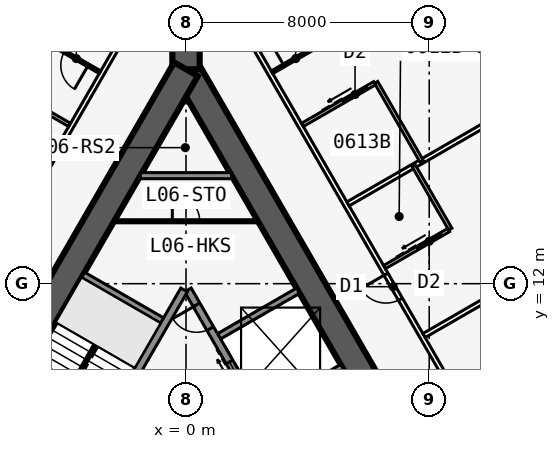
"""IFC4 building model, lengths in metres.
Left out: names, types, materials, properties, quantities, classifications, styles, units other than length and angle.
Written with IfcOpenShell. Run it as: python <this file> out.ifc"""

import sys

from ifc_helpers import new_model, si_unit, direction, frame, frame_2d, origin, place, context, subcontext, project, spatial, rectangle, extrude, element, fill, save


model = new_model("IFC4")
c1 = context("Model", 3, precision=1e-05, world=origin(), true_north=direction((0.0, 1.0)))
c2 = subcontext(c1, "Body", "Model", "MODEL_VIEW")
j1 = project(units=[si_unit("LENGTHUNIT", "METRE"), si_unit("PLANEANGLEUNIT", "RADIAN")], contexts=[c1])
p1 = place(None, origin())
s1 = spatial("IfcSite", under=j1, at=p1, CompositionType="ELEMENT")
p2 = place(p1, origin())
s2 = spatial("IfcBuilding", under=s1, at=p2, CompositionType="ELEMENT")
p3 = place(p2, frame((0.0, 0.0, 31.9)))
s3 = spatial("IfcBuildingStorey", under=s2, at=p3, CompositionType="ELEMENT", Elevation=31.9)
p4 = place(p3, frame((16.5, -9.526, 0.0), z_axis=(0.0, 0.0, 1.0), x_axis=(-0.499999749417, 0.866025548458, 0.0)))
e1 = element("IfcWall", 1, at=p4, inside=s3, PredefinedType="SHEAR", context=c2, shape_type="SweptSolid", body=[
    extrude(rectangle(XDim=33.0, YDim=0.9, at=frame_2d((16.5, 0.0))), origin(), (0.0, 0.0, 1.0), 3.4),
])
p5 = place(p4, frame((14.15, 0.0, 0.0)))
e2 = element("IfcOpeningElement", 2, at=p5, cuts=e1, PredefinedType="OPENING", context=c2, shape_type="SweptSolid", body=[
    extrude(rectangle(XDim=1.8, YDim=2.13, at=frame_2d((0.9, 1.065))), frame((0.0, 0.46, 0.0), z_axis=(0.0, -1.0, 0.0), x_axis=(1.0, 0.0, 0.0)), (0.0, 0.0, 1.0), 0.92),
])
p6 = place(p4, frame((12.6, 0.0, 0.0)))
e3 = element("IfcOpeningElement", 3, at=p6, cuts=e1, PredefinedType="OPENING", context=c2, shape_type="SweptSolid", body=[
    extrude(rectangle(XDim=1.0, YDim=2.13, at=frame_2d((0.5, 1.065))), frame((0.0, 0.46, 0.0), z_axis=(0.0, -1.0, 0.0), x_axis=(1.0, 0.0, 0.0)), (0.0, 0.0, 1.0), 0.92),
])
p7 = place(p3, frame((5.379, 2.586, 0.0), z_axis=(0.0, 0.0, 1.0), x_axis=(-0.500001375892, 0.866024609411, 0.0)))
e4 = element("IfcWall", 4, at=p7, inside=s3, PredefinedType="SOLIDWALL", context=c2, shape_type="SweptSolid", body=[
    extrude(rectangle(XDim=10.633, YDim=0.25, at=frame_2d((5.316, 0.0))), origin(), (0.0, 0.0, 1.0), 3.235),
])
p8 = place(p7, frame((9.164, 0.0, 0.0)))
e5 = element("IfcOpeningElement", 5, at=p8, cuts=e4, PredefinedType="OPENING", context=c2, shape_type="SweptSolid", body=[
    extrude(rectangle(XDim=0.9, YDim=2.13, at=frame_2d((0.45, 1.065))), frame((0.0, 0.135, 0.0), z_axis=(0.0, -1.0, 0.0), x_axis=(1.0, 0.0, 0.0)), (0.0, 0.0, 1.0), 0.27),
])
p9 = place(p7, frame((1.0, 0.0, 0.0)))
e6 = element("IfcOpeningElement", 6, at=p9, cuts=e4, PredefinedType="OPENING", context=c2, shape_type="SweptSolid", body=[
    extrude(rectangle(XDim=1.1, YDim=2.13, at=frame_2d((0.55, 1.065))), frame((0.0, 0.135, 0.0), z_axis=(0.0, -1.0, 0.0), x_axis=(1.0, 0.0, 0.0)), (0.0, 0.0, 1.0), 0.27),
])
p10 = place(p7, frame((3.9, 0.0, 0.0)))
e7 = element("IfcOpeningElement", 7, at=p10, cuts=e4, PredefinedType="OPENING", context=c2, shape_type="SweptSolid", body=[
    extrude(rectangle(XDim=1.1, YDim=2.13, at=frame_2d((0.55, 1.065))), frame((0.0, 0.135, 0.0), z_axis=(0.0, -1.0, 0.0), x_axis=(1.0, 0.0, 0.0)), (0.0, 0.0, 1.0), 0.27),
])
p11 = place(p7, frame((6.8, 0.0, 0.0)))
e8 = element("IfcOpeningElement", 8, at=p11, cuts=e4, PredefinedType="OPENING", context=c2, shape_type="SweptSolid", body=[
    extrude(rectangle(XDim=1.1, YDim=2.13, at=frame_2d((0.55, 1.065))), frame((0.0, 0.135, 0.0), z_axis=(0.0, -1.0, 0.0), x_axis=(1.0, 0.0, 0.0)), (0.0, 0.0, 1.0), 0.27),
])
for number, where, z_axis, x_axis in (
    (9, (2.429, 7.696, 0.0), (0.0, 0.0, 1.0), (0.866, 0.5, 0.0)),
    (10, (0.979, 10.207, 0.0), (0.0, 0.0, 1.0), (0.866, 0.5, 0.0)),
):
    element("IfcWall", number, at=place(p3, frame(where, z_axis=z_axis, x_axis=x_axis)), inside=s3, PredefinedType="SOLIDWALL", context=c2, shape_type="SweptSolid", body=[
        extrude(rectangle(XDim=3.125, YDim=0.2, at=frame_2d((1.562, 0.0))), origin(), (0.0, 0.0, 1.0), 3.235),
    ])
p12 = place(p3, frame((0.0, 19.052, 0.0), z_axis=(0.0, 0.0, 1.0), x_axis=(-0.499999749417, -0.866025548458, 0.0)))
e11 = element("IfcWall", 11, at=p12, inside=s3, PredefinedType="SHEAR", context=c2, shape_type="SweptSolid", body=[
    extrude(rectangle(XDim=33.0, YDim=0.9, at=frame_2d((16.5, 0.0))), origin(), (0.0, 0.0, 1.0), 3.4),
])
p13 = place(p12, frame((14.15, 0.0, 0.0)))
e12 = element("IfcOpeningElement", 12, at=p13, cuts=e11, PredefinedType="OPENING", context=c2, shape_type="SweptSolid", body=[
    extrude(rectangle(XDim=1.8, YDim=2.13, at=frame_2d((0.9, 1.065))), frame((0.0, 0.46, 0.0), z_axis=(0.0, -1.0, 0.0), x_axis=(1.0, 0.0, 0.0)), (0.0, 0.0, 1.0), 0.92),
])
p14 = place(p12, frame((12.6, 0.0, 0.0)))
e13 = element("IfcOpeningElement", 13, at=p14, cuts=e11, PredefinedType="OPENING", context=c2, shape_type="SweptSolid", body=[
    extrude(rectangle(XDim=1.0, YDim=2.13, at=frame_2d((0.5, 1.065))), frame((0.0, 0.46, 0.0), z_axis=(0.0, -1.0, 0.0), x_axis=(1.0, 0.0, 0.0)), (0.0, 0.0, 1.0), 0.92),
])
p15 = place(p3, frame((-0.062, 11.794, 0.0), z_axis=(0.0, 0.0, 1.0), x_axis=(-0.500006680225, -0.86602154692, 0.0)))
e14 = element("IfcWall", 14, at=p15, inside=s3, PredefinedType="SOLIDWALL", context=c2, shape_type="SweptSolid", body=[
    extrude(rectangle(XDim=7.733, YDim=0.25, at=frame_2d((3.866, 0.0))), origin(), (0.0, 0.0, 1.0), 3.235),
])
p16 = place(p3, frame((-0.679, 10.727, 0.0), z_axis=(0.0, 0.0, 1.0), x_axis=(-0.866022959057, 0.500004234368, 0.0)))
e15 = element("IfcWall", 15, at=p16, inside=s3, PredefinedType="SOLIDWALL", context=c2, shape_type="SweptSolid", body=[
    extrude(rectangle(XDim=3.125, YDim=0.2, at=frame_2d((1.562, 0.0))), origin(), (0.0, 0.0, 1.0), 3.235),
])
p17 = place(p3, frame((0.0, 19.052, 0.0), z_axis=(0.0, 0.0, 1.0), x_axis=(0.0, 1.0, 0.0)))
e16 = element("IfcWall", 16, at=p17, inside=s3, PredefinedType="SHEAR", context=c2, shape_type="SweptSolid", body=[
    extrude(rectangle(XDim=4.746, YDim=0.9, at=frame_2d((2.373, 0.0))), origin(), (0.0, 0.0, 1.0), 3.4),
])
p18 = place(p17, frame((1.8, 0.0, 0.0)))
e17 = element("IfcOpeningElement", 17, at=p18, cuts=e16, PredefinedType="OPENING", context=c2, shape_type="SweptSolid", body=[
    extrude(rectangle(XDim=1.8, YDim=2.13, at=frame_2d((0.9, 1.065))), frame((0.0, 0.46, 0.0), z_axis=(0.0, -1.0, 0.0), x_axis=(1.0, 0.0, 0.0)), (0.0, 0.0, 1.0), 0.92),
])
p19 = place(p3, frame((20.027, -10.985, 0.0), z_axis=(0.0, 0.0, 1.0), x_axis=(-0.500001677587, 0.866024435227, 0.0)))
e18 = element("IfcWall", 18, at=p19, inside=s3, PredefinedType="PARTITIONING", context=c2, shape_type="SweptSolid", body=[
    extrude(rectangle(XDim=39.054, YDim=0.15, at=frame_2d((19.527, 0.0))), origin(), (0.0, 0.0, 1.0), 3.235),
])
p20 = place(p19, frame((0.352, 0.0, 0.0)))
e19 = element("IfcOpeningElement", 19, at=p20, cuts=e18, PredefinedType="OPENING", context=c2, shape_type="SweptSolid", body=[
    extrude(rectangle(XDim=0.95, YDim=2.13, at=frame_2d((0.475, 1.065))), frame((0.0, 0.085, 0.0), z_axis=(0.0, -1.0, 0.0), x_axis=(1.0, 0.0, 0.0)), (0.0, 0.0, 1.0), 0.17),
])
p21 = place(p19, frame((5.952, 0.0, 0.0)))
e20 = element("IfcOpeningElement", 20, at=p21, cuts=e18, PredefinedType="OPENING", context=c2, shape_type="SweptSolid", body=[
    extrude(rectangle(XDim=0.95, YDim=2.13, at=frame_2d((0.475, 1.065))), frame((0.0, 0.085, 0.0), z_axis=(0.0, -1.0, 0.0), x_axis=(1.0, 0.0, 0.0)), (0.0, 0.0, 1.0), 0.17),
])
p22 = place(p19, frame((12.152, 0.0, 0.0)))
e21 = element("IfcOpeningElement", 21, at=p22, cuts=e18, PredefinedType="OPENING", context=c2, shape_type="SweptSolid", body=[
    extrude(rectangle(XDim=0.95, YDim=2.13, at=frame_2d((0.475, 1.065))), frame((0.0, 0.085, 0.0), z_axis=(0.0, -1.0, 0.0), x_axis=(1.0, 0.0, 0.0)), (0.0, 0.0, 1.0), 0.17),
])
p23 = place(p19, frame((15.952, 0.0, 0.0)))
e22 = element("IfcOpeningElement", 22, at=p23, cuts=e18, PredefinedType="OPENING", context=c2, shape_type="SweptSolid", body=[
    extrude(rectangle(XDim=0.95, YDim=2.13, at=frame_2d((0.475, 1.065))), frame((0.0, 0.085, 0.0), z_axis=(0.0, -1.0, 0.0), x_axis=(1.0, 0.0, 0.0)), (0.0, 0.0, 1.0), 0.17),
])
p24 = place(p19, frame((22.152, 0.0, 0.0)))
e23 = element("IfcOpeningElement", 23, at=p24, cuts=e18, PredefinedType="OPENING", context=c2, shape_type="SweptSolid", body=[
    extrude(rectangle(XDim=0.95, YDim=2.13, at=frame_2d((0.475, 1.065))), frame((0.0, 0.085, 0.0), z_axis=(0.0, -1.0, 0.0), x_axis=(1.0, 0.0, 0.0)), (0.0, 0.0, 1.0), 0.17),
])
p25 = place(p19, frame((25.952, 0.0, 0.0)))
e24 = element("IfcOpeningElement", 24, at=p25, cuts=e18, PredefinedType="OPENING", context=c2, shape_type="SweptSolid", body=[
    extrude(rectangle(XDim=0.95, YDim=2.13, at=frame_2d((0.475, 1.065))), frame((0.0, 0.085, 0.0), z_axis=(0.0, -1.0, 0.0), x_axis=(1.0, 0.0, 0.0)), (0.0, 0.0, 1.0), 0.17),
])
p26 = place(p19, frame((36.546, 0.0, 0.0)))
e25 = element("IfcOpeningElement", 25, at=p26, cuts=e18, PredefinedType="OPENING", context=c2, shape_type="SweptSolid", body=[
    extrude(rectangle(XDim=0.95, YDim=2.13, at=frame_2d((0.475, 1.065))), frame((0.0, 0.085, 0.0), z_axis=(0.0, -1.0, 0.0), x_axis=(1.0, 0.0, 0.0)), (0.0, 0.0, 1.0), 0.17),
])
p27 = place(p3, frame((7.829, 10.293, 0.0), z_axis=(0.0, 0.0, 1.0), x_axis=(0.866016302457, 0.50001576363, 0.0)))
e26 = element("IfcWall", 26, at=p27, inside=s3, PredefinedType="PARTITIONING", context=c2, shape_type="SweptSolid", body=[
    extrude(rectangle(XDim=9.943, YDim=0.15, at=frame_2d((4.972, 0.0))), origin(), (0.0, 0.0, 1.0), 2.389),
])
p28 = place(p3, frame((5.329, 14.623, 0.0), z_axis=(0.0, 0.0, 1.0), x_axis=(0.866018409083, 0.500012114982, 0.0)))
e27 = element("IfcWall", 27, at=p28, inside=s3, PredefinedType="PARTITIONING", context=c2, shape_type="SweptSolid", body=[
    extrude(rectangle(XDim=9.485, YDim=0.15, at=frame_2d((4.742, 0.0))), origin(), (0.0, 0.0, 1.0), 2.389),
])
p29 = place(p3, frame((2.829, 18.954, 0.0), z_axis=(0.0, 0.0, 1.0), x_axis=(0.866020536561, 0.500008430184, 0.0)))
e28 = element("IfcWall", 28, at=p29, inside=s3, PredefinedType="PARTITIONING", context=c2, shape_type="SweptSolid", body=[
    extrude(rectangle(XDim=8.72, YDim=0.1, at=frame_2d((4.36, 0.0))), origin(), (0.0, 0.0, 1.0), 2.389),
])
p30 = place(p29, frame((0.45, 0.0, 0.0)))
e29 = element("IfcOpeningElement", 29, at=p30, cuts=e28, PredefinedType="OPENING", context=c2, shape_type="SweptSolid", body=[
    extrude(rectangle(XDim=0.9, YDim=2.13, at=frame_2d((0.45, 1.065))), frame((0.0, 0.06, 0.0), z_axis=(0.0, -1.0, 0.0), x_axis=(1.0, 0.0, 0.0)), (0.0, 0.0, 1.0), 0.12),
])
p31 = place(p3, frame((9.128, 8.042, 0.0), z_axis=(0.0, 0.0, 1.0), x_axis=(0.866005645448, 0.500034220881, 0.0)))
e30 = element("IfcWall", 30, at=p31, inside=s3, PredefinedType="PLUMBINGWALL", context=c2, shape_type="SweptSolid", body=[
    extrude(rectangle(XDim=2.44, YDim=0.12, at=frame_2d((1.22, 0.0))), origin(), (0.0, 0.0, 1.0), 3.235),
])
p32 = place(p31, frame((1.25, 0.0, 0.0)))
e31 = element("IfcOpeningElement", 31, at=p32, cuts=e30, PredefinedType="OPENING", context=c2, shape_type="SweptSolid", body=[
    extrude(rectangle(XDim=0.9, YDim=2.13, at=frame_2d((0.45, 1.065))), frame((0.0, 0.07, 0.0), z_axis=(0.0, -1.0, 0.0), x_axis=(1.0, 0.0, 0.0)), (0.0, 0.0, 1.0), 0.14),
])
p33 = place(p3, frame((8.694, 13.795, 0.0), z_axis=(0.0, 0.0, 1.0), x_axis=(-0.500077600433, 0.865980596518, 0.0)))
e32 = element("IfcWall", 32, at=p33, inside=s3, PredefinedType="PLUMBINGWALL", context=c2, shape_type="SweptSolid", body=[
    extrude(rectangle(XDim=2.4, YDim=0.12, at=frame_2d((1.2, 0.0))), origin(), (0.0, 0.0, 1.0), 3.235),
])
p34 = place(p3, frame((6.529, 12.545, 0.0), z_axis=(0.0, 0.0, 1.0), x_axis=(0.866023955769, 0.500002508028, 0.0)))
e33 = element("IfcWall", 33, at=p34, inside=s3, PredefinedType="PLUMBINGWALL", context=c2, shape_type="SweptSolid", body=[
    extrude(rectangle(XDim=2.44, YDim=0.12, at=frame_2d((1.22, 0.0))), origin(), (0.0, 0.0, 1.0), 3.235),
])
p35 = place(p34, frame((1.25, 0.0, 0.0)))
e34 = element("IfcOpeningElement", 34, at=p35, cuts=e33, PredefinedType="OPENING", context=c2, shape_type="SweptSolid", body=[
    extrude(rectangle(XDim=0.9, YDim=2.13, at=frame_2d((0.45, 1.065))), frame((0.0, 0.07, 0.0), z_axis=(0.0, -1.0, 0.0), x_axis=(1.0, 0.0, 0.0)), (0.0, 0.0, 1.0), 0.14),
])
p36 = place(p3, frame((7.753, 16.023, 0.0), z_axis=(0.0, 0.0, 1.0), x_axis=(-0.499990139034, 0.866031096941, 0.0)))
e35 = element("IfcWall", 35, at=p36, inside=s3, PredefinedType="PLUMBINGWALL", context=c2, shape_type="SweptSolid", body=[
    extrude(rectangle(XDim=3.0, YDim=0.12, at=frame_2d((1.5, 0.0))), origin(), (0.0, 0.0, 1.0), 3.235),
])
p37 = place(p3, frame((3.829, 17.221, 0.0), z_axis=(0.0, 0.0, 1.0), x_axis=(0.865997131366, 0.500048966069, 0.0)))
e36 = element("IfcWall", 36, at=p37, inside=s3, PredefinedType="PLUMBINGWALL", context=c2, shape_type="SweptSolid", body=[
    extrude(rectangle(XDim=2.74, YDim=0.12, at=frame_2d((1.37, 0.0))), origin(), (0.0, 0.0, 1.0), 3.235),
])
p38 = place(p37, frame((1.55, 0.0, 0.0)))
e37 = element("IfcOpeningElement", 37, at=p38, cuts=e36, PredefinedType="OPENING", context=c2, shape_type="SweptSolid", body=[
    extrude(rectangle(XDim=0.9, YDim=2.13, at=frame_2d((0.45, 1.065))), frame((0.0, 0.07, 0.0), z_axis=(0.0, -1.0, 0.0), x_axis=(1.0, 0.0, 0.0)), (0.0, 0.0, 1.0), 0.14),
])
p39 = place(p3, frame((-0.5, 22.836, 0.0), z_axis=(0.0, 0.0, 1.0), x_axis=(-0.500001677587, -0.866024435227, 0.0)))
e38 = element("IfcWall", 38, at=p39, inside=s3, PredefinedType="PARTITIONING", context=c2, shape_type="SweptSolid", body=[
    extrude(rectangle(XDim=39.054, YDim=0.15, at=frame_2d((19.527, 0.0))), origin(), (0.0, 0.0, 1.0), 3.235),
])
p40 = place(p39, frame((1.558, 0.0, 0.0)))
e39 = element("IfcOpeningElement", 39, at=p40, cuts=e38, PredefinedType="OPENING", context=c2, shape_type="SweptSolid", body=[
    extrude(rectangle(XDim=0.95, YDim=2.13, at=frame_2d((0.475, 1.065))), frame((0.0, 0.085, 0.0), z_axis=(0.0, -1.0, 0.0), x_axis=(1.0, 0.0, 0.0)), (0.0, 0.0, 1.0), 0.17),
])
p41 = place(p39, frame((15.352, 0.0, 0.0)))
e40 = element("IfcOpeningElement", 40, at=p41, cuts=e38, PredefinedType="OPENING", context=c2, shape_type="SweptSolid", body=[
    extrude(rectangle(XDim=0.95, YDim=2.13, at=frame_2d((0.475, 1.065))), frame((0.0, 0.085, 0.0), z_axis=(0.0, -1.0, 0.0), x_axis=(1.0, 0.0, 0.0)), (0.0, 0.0, 1.0), 0.17),
])
p42 = place(p39, frame((22.752, 0.0, 0.0)))
e41 = element("IfcOpeningElement", 41, at=p42, cuts=e38, PredefinedType="OPENING", context=c2, shape_type="SweptSolid", body=[
    extrude(rectangle(XDim=0.95, YDim=2.13, at=frame_2d((0.475, 1.065))), frame((0.0, 0.085, 0.0), z_axis=(0.0, -1.0, 0.0), x_axis=(1.0, 0.0, 0.0)), (0.0, 0.0, 1.0), 0.17),
])
p43 = place(p39, frame((30.952, 0.0, 0.0)))
e42 = element("IfcOpeningElement", 42, at=p43, cuts=e38, PredefinedType="OPENING", context=c2, shape_type="SweptSolid", body=[
    extrude(rectangle(XDim=0.95, YDim=2.13, at=frame_2d((0.475, 1.065))), frame((0.0, 0.085, 0.0), z_axis=(0.0, -1.0, 0.0), x_axis=(1.0, 0.0, 0.0)), (0.0, 0.0, 1.0), 0.17),
])
p44 = place(p39, frame((37.752, 0.0, 0.0)))
e43 = element("IfcOpeningElement", 43, at=p44, cuts=e38, PredefinedType="OPENING", context=c2, shape_type="SweptSolid", body=[
    extrude(rectangle(XDim=0.95, YDim=2.13, at=frame_2d((0.475, 1.065))), frame((0.0, 0.085, 0.0), z_axis=(0.0, -1.0, 0.0), x_axis=(1.0, 0.0, 0.0)), (0.0, 0.0, 1.0), 0.17),
])
p45 = place(p3, frame((-2.829, 18.954, 0.0), z_axis=(0.0, 0.0, 1.0), x_axis=(-0.866020536561, 0.500008430184, 0.0)))
e44 = element("IfcWall", 44, at=p45, inside=s3, PredefinedType="PARTITIONING", context=c2, shape_type="SweptSolid", body=[
    extrude(rectangle(XDim=8.72, YDim=0.1, at=frame_2d((4.36, 0.0))), origin(), (0.0, 0.0, 1.0), 2.389),
])
p46 = place(p45, frame((0.45, 0.0, 0.0)))
e45 = element("IfcOpeningElement", 45, at=p46, cuts=e44, PredefinedType="OPENING", context=c2, shape_type="SweptSolid", body=[
    extrude(rectangle(XDim=0.9, YDim=2.13, at=frame_2d((0.45, 1.065))), frame((0.0, 0.06, 0.0), z_axis=(0.0, -1.0, 0.0), x_axis=(1.0, 0.0, 0.0)), (0.0, 0.0, 1.0), 0.12),
])
p47 = place(p3, frame((-3.829, 17.221, 0.0), z_axis=(0.0, 0.0, 1.0), x_axis=(-0.865997131366, 0.500048966069, 0.0)))
e46 = element("IfcWall", 46, at=p47, inside=s3, PredefinedType="PLUMBINGWALL", context=c2, shape_type="SweptSolid", body=[
    extrude(rectangle(XDim=2.74, YDim=0.12, at=frame_2d((1.37, 0.0))), origin(), (0.0, 0.0, 1.0), 3.235),
])
p48 = place(p47, frame((1.55, 0.0, 0.0)))
e47 = element("IfcOpeningElement", 47, at=p48, cuts=e46, PredefinedType="OPENING", context=c2, shape_type="SweptSolid", body=[
    extrude(rectangle(XDim=0.9, YDim=2.13, at=frame_2d((0.45, 1.065))), frame((0.0, 0.07, 0.0), z_axis=(0.0, -1.0, 0.0), x_axis=(1.0, 0.0, 0.0)), (0.0, 0.0, 1.0), 0.14),
])
p49 = place(p3, frame((-1.501, 15.552, 0.0), z_axis=(0.0, 0.0, 1.0), x_axis=(1.0, 0.0, 0.0)))
e48 = element("IfcWall", 48, at=p49, inside=s3, PredefinedType="SOLIDWALL", context=c2, shape_type="SweptSolid", body=[
    extrude(rectangle(XDim=3.002, YDim=0.2, at=frame_2d((1.501, 0.0))), origin(), (0.0, 0.0, 1.0), 3.235),
])
p50 = place(p3, frame((-2.367, 14.052, 0.0), z_axis=(0.0, 0.0, 1.0), x_axis=(1.0, 0.0, 0.0)))
e49 = element("IfcWall", 49, at=p50, inside=s3, PredefinedType="PARTITIONING", context=c2, shape_type="SweptSolid", body=[
    extrude(rectangle(XDim=4.734, YDim=0.1, at=frame_2d((2.367, 0.0))), origin(), (0.0, 0.0, 1.0), 3.235),
])
p51 = place(p50, frame((1.917, 0.0, 0.0)))
e50 = element("IfcOpeningElement", 50, at=p51, cuts=e49, PredefinedType="OPENING", context=c2, shape_type="SweptSolid", body=[
    extrude(rectangle(XDim=0.9, YDim=2.13, at=frame_2d((0.45, 1.065))), frame((0.0, 0.06, 0.0), z_axis=(0.0, -1.0, 0.0), x_axis=(1.0, 0.0, 0.0)), (0.0, 0.0, 1.0), 0.12),
])
p52 = place(p3, frame((-2.988, 9.978, 0.0), z_axis=(0.0, 0.0, 1.0), x_axis=(-0.499992232847, -0.866029888106, 0.0)))
e51 = element("IfcWall", 51, at=p52, inside=s3, PredefinedType="SOLIDWALL", context=c2, shape_type="SweptSolid", body=[
    extrude(rectangle(XDim=2.794, YDim=0.1, at=frame_2d((1.397, 0.0))), origin(), (0.0, 0.0, 1.0), 3.4),
])
p53 = place(p30, origin())
e52 = element("IfcDoor", 52, at=p53, inside=s3, OperationType="SINGLE_SWING_LEFT", PredefinedType="DOOR", context=c2, shape_type="SweptSolid", body=[
    extrude(rectangle(XDim=0.9, YDim=2.13, at=frame_2d((0.45, 1.065))), frame((0.0, 0.025, 0.0), z_axis=(0.0, -1.0, 0.0), x_axis=(1.0, 0.0, 0.0)), (0.0, 0.0, 1.0), 0.05),
])
fill(e29, e52)
p54 = place(p35, origin())
e53 = element("IfcDoor", 53, at=p54, inside=s3, OperationType="SLIDING_TO_LEFT", PredefinedType="DOOR", context=c2, shape_type="SweptSolid", body=[
    extrude(rectangle(XDim=0.9, YDim=2.13, at=frame_2d((0.45, 1.065))), frame((0.0, 0.025, 0.0), z_axis=(0.0, -1.0, 0.0), x_axis=(1.0, 0.0, 0.0)), (0.0, 0.0, 1.0), 0.05),
])
fill(e34, e53)
p55 = place(p25, origin())
e54 = element("IfcDoor", 54, at=p55, inside=s3, OperationType="SINGLE_SWING_RIGHT", PredefinedType="DOOR", context=c2, shape_type="SweptSolid", body=[
    extrude(rectangle(XDim=0.95, YDim=2.13, at=frame_2d((0.475, 1.065))), frame((0.0, 0.025, 0.0), z_axis=(0.0, -1.0, 0.0), x_axis=(1.0, 0.0, 0.0)), (0.0, 0.0, 1.0), 0.05),
])
fill(e24, e54)
p56 = place(p38, origin())
e55 = element("IfcDoor", 55, at=p56, inside=s3, OperationType="SLIDING_TO_LEFT", PredefinedType="DOOR", context=c2, shape_type="SweptSolid", body=[
    extrude(rectangle(XDim=0.9, YDim=2.13, at=frame_2d((0.45, 1.065))), frame((0.0, 0.025, 0.0), z_axis=(0.0, -1.0, 0.0), x_axis=(1.0, 0.0, 0.0)), (0.0, 0.0, 1.0), 0.05),
])
fill(e37, e55)
p57 = place(p46, origin())
e56 = element("IfcDoor", 56, at=p57, inside=s3, OperationType="SINGLE_SWING_LEFT", PredefinedType="DOOR", context=c2, shape_type="SweptSolid", body=[
    extrude(rectangle(XDim=0.9, YDim=2.13, at=frame_2d((0.45, 1.065))), frame((0.0, 0.025, 0.0), z_axis=(0.0, -1.0, 0.0), x_axis=(1.0, 0.0, 0.0)), (0.0, 0.0, 1.0), 0.05),
])
fill(e45, e56)
p58 = place(p51, origin())
e57 = element("IfcDoor", 57, at=p58, inside=s3, OperationType="SINGLE_SWING_LEFT", PredefinedType="DOOR", context=c2, shape_type="SweptSolid", body=[
    extrude(rectangle(XDim=0.9, YDim=2.13, at=frame_2d((0.45, 1.065))), frame((0.0, 0.025, 0.0), z_axis=(0.0, -1.0, 0.0), x_axis=(1.0, 0.0, 0.0)), (0.0, 0.0, 1.0), 0.05),
])
fill(e50, e57)
p59 = place(p8, origin())
e58 = element("IfcDoor", 58, at=p59, inside=s3, OperationType="SINGLE_SWING_RIGHT", PredefinedType="DOOR", context=c2, shape_type="SweptSolid", body=[
    extrude(rectangle(XDim=0.9, YDim=2.13, at=frame_2d((0.45, 1.065))), frame((0.0, 0.025, 0.0), z_axis=(0.0, -1.0, 0.0), x_axis=(1.0, 0.0, 0.0)), (0.0, 0.0, 1.0), 0.05),
])
fill(e5, e58)
p60 = place(p11, origin())
e59 = element("IfcDoor", 59, at=p60, inside=s3, OperationType="DOUBLE_DOOR_SLIDING", PredefinedType="USERDEFINED", context=c2, shape_type="SweptSolid", body=[
    extrude(rectangle(XDim=1.1, YDim=2.13, at=frame_2d((0.55, 1.065))), frame((0.0, 0.025, 0.0), z_axis=(0.0, -1.0, 0.0), x_axis=(1.0, 0.0, 0.0)), (0.0, 0.0, 1.0), 0.05),
])
fill(e8, e59)
save(model, sys.argv[1])
